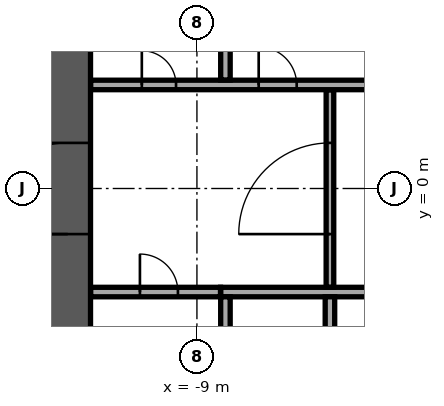
"""IFC4 building model, lengths in metres.
Left out: names, types, materials, properties, quantities, classifications, styles, units other than length and angle.
Written with IfcOpenShell. Run it as: python <this file> out.ifc"""

import sys

from ifc_helpers import new_model, si_unit, direction, frame, frame_2d, origin, place, context, subcontext, project, spatial, rectangle, extrude, element, fill, save


model = new_model("IFC4")
c1 = context("Model", 3, precision=1e-05, world=origin(), true_north=direction((0.0, 1.0)))
c2 = subcontext(c1, "Body", "Model", "MODEL_VIEW")
j1 = project(units=[si_unit("LENGTHUNIT", "METRE"), si_unit("PLANEANGLEUNIT", "RADIAN")], contexts=[c1])
p1 = place(None, origin())
s1 = spatial("IfcSite", under=j1, at=p1, CompositionType="ELEMENT")
p2 = place(p1, origin())
s2 = spatial("IfcBuilding", under=s1, at=p2, CompositionType="ELEMENT")
p3 = place(p2, frame((0.0, 0.0, 13.5)))
s3 = spatial("IfcBuildingStorey", under=s2, at=p3, CompositionType="ELEMENT", Elevation=13.5)
p4 = place(p3, frame((-12.4, -11.8, 0.0), z_axis=(0.0, 0.0, 1.0), x_axis=(0.0, 1.0, 0.0)))
e1 = element("IfcWall", 1, at=p4, inside=s3, PredefinedType="SHEAR", context=c2, shape_type="SweptSolid", body=[
    extrude(rectangle(XDim=23.6, YDim=1.2, at=frame_2d((11.8, 0.0))), origin(), (0.0, 0.0, 1.0), 4.1),
])
p5 = place(p4, frame((10.6, 0.0, 0.0)))
e2 = element("IfcOpeningElement", 2, at=p5, cuts=e1, PredefinedType="OPENING", context=c2, shape_type="SweptSolid", body=[
    extrude(rectangle(XDim=2.4, YDim=2.4, at=frame_2d((1.2, 1.2))), frame((0.0, 0.61, 0.0), z_axis=(0.0, -1.0, 0.0), x_axis=(1.0, 0.0, 0.0)), (0.0, 0.0, 1.0), 1.22),
])
p6 = place(p3, frame((-8.375, -2.725, 0.0), z_axis=(0.0, 0.0, 1.0), x_axis=(1.0, 0.0, 0.0)))
e3 = element("IfcWall", 3, at=p6, inside=s3, PredefinedType="SOLIDWALL", context=c2, shape_type="SweptSolid", body=[
    extrude(rectangle(XDim=14.0, YDim=0.25, at=frame_2d((7.0, 0.0))), origin(), (0.0, 0.0, 1.0), 4.1),
])
for number, where, z_axis, x_axis in (
    (4, (-8.25, -5.55, 0.0), (0.0, 0.0, 1.0), (0.0, 1.0, 0.0)),
    (5, (-5.5, -5.55, 0.0), (0.0, 0.0, 1.0), (0.0, 1.0, 0.0)),
):
    element("IfcWall", number, at=place(p3, frame(where, z_axis=z_axis, x_axis=x_axis)), inside=s3, PredefinedType="SOLIDWALL", context=c2, shape_type="SweptSolid", body=[
        extrude(rectangle(XDim=2.7, YDim=0.25, at=frame_2d((1.35, 0.0))), origin(), (0.0, 0.0, 1.0), 4.1),
    ])
p7 = place(p3, frame((-11.795, -2.725, 0.0), z_axis=(0.0, 0.0, 1.0), x_axis=(1.0, 0.0, 0.0)))
e6 = element("IfcWall", 6, at=p7, inside=s3, PredefinedType="PARTITIONING", context=c2, shape_type="SweptSolid", body=[
    extrude(rectangle(XDim=3.415, YDim=0.25, at=frame_2d((1.708, 0.0))), origin(), (0.0, 0.0, 1.0), 4.1),
])
p8 = place(p7, frame((1.295, 0.0, 0.0)))
e7 = element("IfcOpeningElement", 7, at=p8, cuts=e6, PredefinedType="OPENING", context=c2, shape_type="SweptSolid", body=[
    extrude(rectangle(XDim=1.0, YDim=2.1, at=frame_2d((0.5, 1.05))), frame((0.0, 0.135, 0.0), z_axis=(0.0, -1.0, 0.0), x_axis=(1.0, 0.0, 0.0)), (0.0, 0.0, 1.0), 0.27),
])
p9 = place(p3, frame((-5.5, -2.595, 0.0), z_axis=(0.0, 0.0, 1.0), x_axis=(0.0, 1.0, 0.0)))
e8 = element("IfcWall", 8, at=p9, inside=s3, PredefinedType="PARTITIONING", context=c2, shape_type="SweptSolid", body=[
    extrude(rectangle(XDim=5.19, YDim=0.2, at=frame_2d((2.595, 0.0))), origin(), (0.0, 0.0, 1.0), 4.1),
])
p10 = place(p9, frame((1.395, 0.0, 0.0)))
e9 = element("IfcOpeningElement", 9, at=p10, cuts=e8, PredefinedType="OPENING", context=c2, shape_type="SweptSolid", body=[
    extrude(rectangle(XDim=2.4, YDim=2.4, at=frame_2d((1.2, 1.2))), frame((0.0, 0.11, 0.0), z_axis=(0.0, -1.0, 0.0), x_axis=(1.0, 0.0, 0.0)), (0.0, 0.0, 1.0), 0.22),
])
p11 = place(p3, frame((-11.795, 2.725, 0.0), z_axis=(0.0, 0.0, 1.0), x_axis=(1.0, 0.0, 0.0)))
e10 = element("IfcWall", 10, at=p11, inside=s3, PredefinedType="PARTITIONING", context=c2, shape_type="SweptSolid", body=[
    extrude(rectangle(XDim=23.59, YDim=0.25, at=frame_2d((11.795, 0.0))), origin(), (0.0, 0.0, 1.0), 4.1),
])
p12 = place(p11, frame((21.345, 0.0, 0.0)))
e11 = element("IfcOpeningElement", 11, at=p12, cuts=e10, PredefinedType="OPENING", context=c2, shape_type="SweptSolid", body=[
    extrude(rectangle(XDim=0.9, YDim=2.1, at=frame_2d((0.45, 1.05))), frame((0.0, 0.135, 0.0), z_axis=(0.0, -1.0, 0.0), x_axis=(1.0, 0.0, 0.0)), (0.0, 0.0, 1.0), 0.27),
])
p13 = place(p11, frame((1.345, 0.0, 0.0)))
e12 = element("IfcOpeningElement", 12, at=p13, cuts=e10, PredefinedType="OPENING", context=c2, shape_type="SweptSolid", body=[
    extrude(rectangle(XDim=0.9, YDim=2.1, at=frame_2d((0.45, 1.05))), frame((0.0, 0.135, 0.0), z_axis=(0.0, -1.0, 0.0), x_axis=(1.0, 0.0, 0.0)), (0.0, 0.0, 1.0), 0.27),
])
p14 = place(p11, frame((4.42, 0.0, 0.0)))
e13 = element("IfcOpeningElement", 13, at=p14, cuts=e10, PredefinedType="OPENING", context=c2, shape_type="SweptSolid", body=[
    extrude(rectangle(XDim=1.0, YDim=2.1, at=frame_2d((0.5, 1.05))), frame((0.0, 0.135, 0.0), z_axis=(0.0, -1.0, 0.0), x_axis=(1.0, 0.0, 0.0)), (0.0, 0.0, 1.0), 0.27),
])
p15 = place(p11, frame((9.82, 0.0, 0.0)))
e14 = element("IfcOpeningElement", 14, at=p15, cuts=e10, PredefinedType="OPENING", context=c2, shape_type="SweptSolid", body=[
    extrude(rectangle(XDim=1.2, YDim=2.1, at=frame_2d((0.6, 1.05))), frame((0.0, 0.135, 0.0), z_axis=(0.0, -1.0, 0.0), x_axis=(1.0, 0.0, 0.0)), (0.0, 0.0, 1.0), 0.27),
])
p16 = place(p3, frame((-8.25, 2.855, 0.0), z_axis=(0.0, 0.0, 1.0), x_axis=(0.0, 1.0, 0.0)))
e15 = element("IfcWall", 15, at=p16, inside=s3, PredefinedType="PARTITIONING", context=c2, shape_type="SweptSolid", body=[
    extrude(rectangle(XDim=1.715, YDim=0.25, at=frame_2d((0.857, 0.0))), origin(), (0.0, 0.0, 1.0), 4.1),
])
p17 = place(p5, origin())
e16 = element("IfcDoor", 16, at=p17, inside=s3, OperationType="SINGLE_SWING_LEFT", PredefinedType="DOOR", context=c2, shape_type="SweptSolid", body=[
    extrude(rectangle(XDim=2.4, YDim=2.4, at=frame_2d((1.2, 1.2))), frame((0.0, 0.025, 0.0), z_axis=(0.0, -1.0, 0.0), x_axis=(1.0, 0.0, 0.0)), (0.0, 0.0, 1.0), 0.05),
])
fill(e2, e16)
p18 = place(p8, origin())
e17 = element("IfcDoor", 17, at=p18, inside=s3, OperationType="SINGLE_SWING_RIGHT", PredefinedType="DOOR", context=c2, shape_type="SweptSolid", body=[
    extrude(rectangle(XDim=1.0, YDim=2.1, at=frame_2d((0.5, 1.05))), frame((0.0, 0.025, 0.0), z_axis=(0.0, -1.0, 0.0), x_axis=(1.0, 0.0, 0.0)), (0.0, 0.0, 1.0), 0.05),
])
fill(e7, e17)
p19 = place(p13, origin())
e18 = element("IfcDoor", 18, at=p19, inside=s3, OperationType="SINGLE_SWING_RIGHT", PredefinedType="DOOR", context=c2, shape_type="SweptSolid", body=[
    extrude(rectangle(XDim=0.9, YDim=2.1, at=frame_2d((0.45, 1.05))), frame((0.0, 0.025, 0.0), z_axis=(0.0, -1.0, 0.0), x_axis=(1.0, 0.0, 0.0)), (0.0, 0.0, 1.0), 0.05),
])
fill(e12, e18)
p20 = place(p14, origin())
e19 = element("IfcDoor", 19, at=p20, inside=s3, OperationType="SINGLE_SWING_RIGHT", PredefinedType="DOOR", context=c2, shape_type="SweptSolid", body=[
    extrude(rectangle(XDim=1.0, YDim=2.1, at=frame_2d((0.5, 1.05))), frame((0.0, 0.025, 0.0), z_axis=(0.0, -1.0, 0.0), x_axis=(1.0, 0.0, 0.0)), (0.0, 0.0, 1.0), 0.05),
])
fill(e13, e19)
p21 = place(p10, origin())
e20 = element("IfcDoor", 20, at=p21, inside=s3, OperationType="DOUBLE_DOOR_DOUBLE_SWING", PredefinedType="DOOR", context=c2, shape_type="SweptSolid", body=[
    extrude(rectangle(XDim=2.4, YDim=2.4, at=frame_2d((1.2, 1.2))), frame((0.0, 0.025, 0.0), z_axis=(0.0, -1.0, 0.0), x_axis=(1.0, 0.0, 0.0)), (0.0, 0.0, 1.0), 0.05),
])
fill(e9, e20)
save(model, sys.argv[1])
